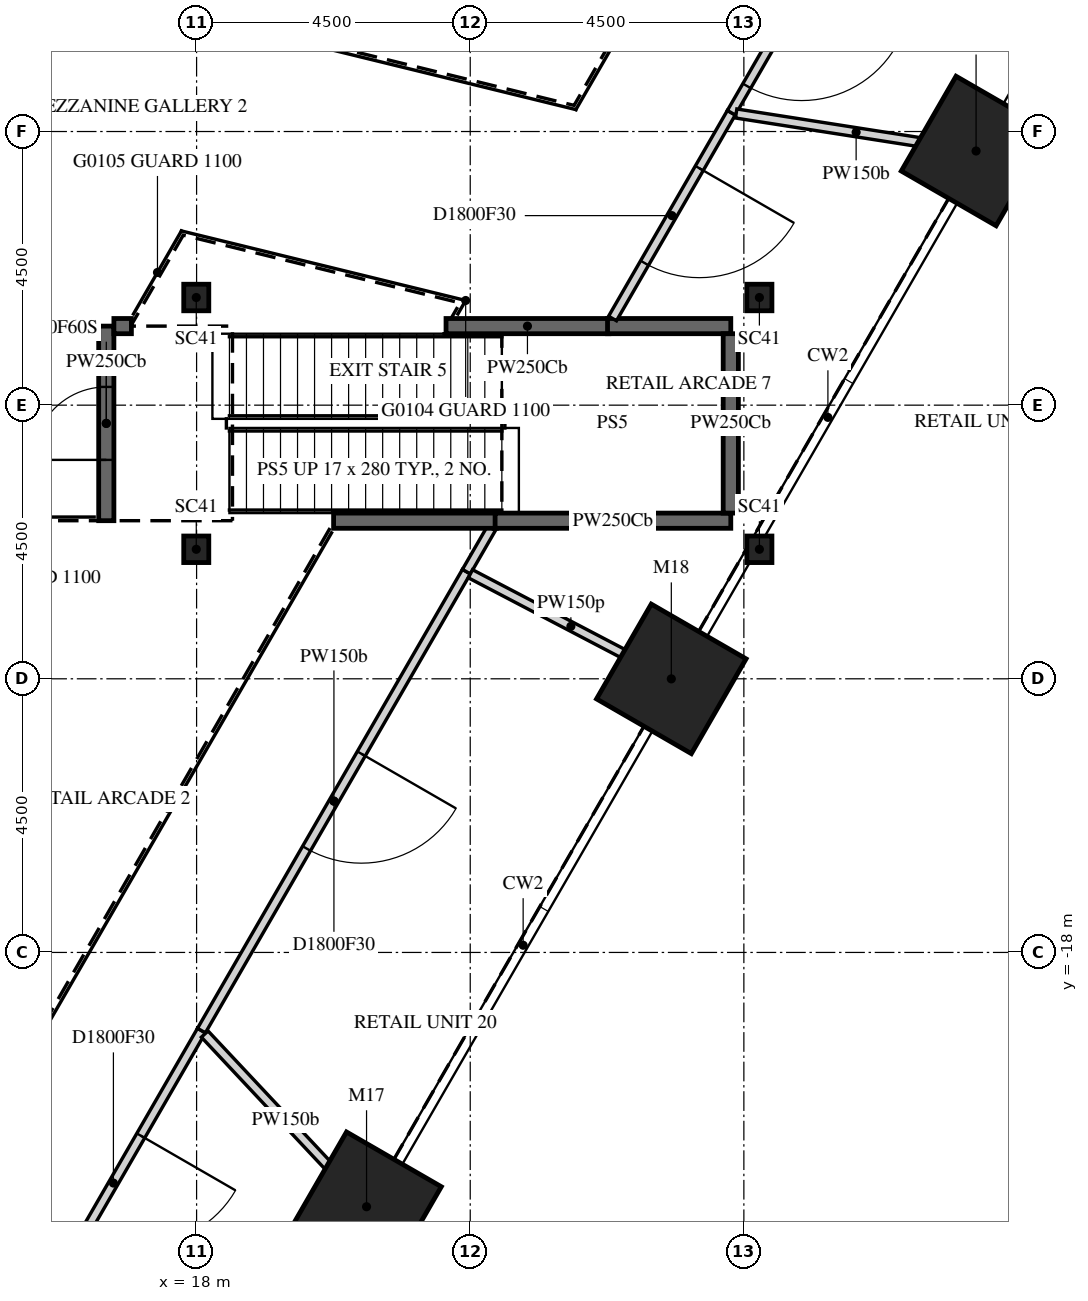
"""IFC4 building model, lengths in metres.
Left out: names, types, materials, properties, quantities, classifications, styles, units other than length and angle.
Written with IfcOpenShell. Run it as: python <this file> out.ifc"""

import sys

from ifc_helpers import new_model, si_unit, direction, frame, frame_2d, origin, origin_2d, place, context, subcontext, project, spatial, polyline, rectangle, i_section, outline, extrude, element, fill, save


model = new_model("IFC4")
c1 = context("Model", 3, precision=1e-05, world=origin(), true_north=direction((0.0, 1.0)))
c2 = subcontext(c1, "Body", "Model", "MODEL_VIEW")
j1 = project(units=[si_unit("LENGTHUNIT", "METRE"), si_unit("PLANEANGLEUNIT", "RADIAN")], contexts=[c1])
p1 = place(None, origin())
s1 = spatial("IfcSite", under=j1, at=p1, CompositionType="ELEMENT")
p2 = place(p1, origin())
s2 = spatial("IfcBuilding", under=s1, at=p2, CompositionType="ELEMENT")
p3 = place(p2, frame((0.0, 0.0, 9.0)))
s3 = spatial("IfcBuildingStorey", under=s2, at=p3, CompositionType="ELEMENT", Elevation=9.0)
for number, where, z_axis, x_axis in (
    (1, (20.795, -22.182, -0.25), (0.0, 0.0, 1.0), (-0.5, -0.866, 0.0)),
    (2, (25.807, -13.501, -0.25), (0.0, 0.0, 1.0), (-0.5, -0.866, 0.0)),
    (3, (30.819, -4.82, -0.25), (0.0, 0.0, 1.0), (-0.5, -0.866, 0.0)),
):
    element("IfcColumn", number, at=place(p3, frame(where, z_axis=z_axis, x_axis=x_axis)), inside=s3, PredefinedType="COLUMN", context=c2, shape_type="SweptSolid", body=[
        extrude(rectangle(XDim=1.8, YDim=1.8, at=origin_2d()), origin(), (0.0, 0.0, 1.0), 6.0),
    ])
for number, where, z_axis, x_axis in (
    (4, (27.255, -7.23, -0.25), (0.0, 0.0, 1.0), (1.0, 0.0, 0.0)),
    (5, (27.255, -11.37, -0.25), (0.0, 0.0, 1.0), (1.0, 0.0, 0.0)),
    (6, (17.995, -11.37, -0.25), (0.0, 0.0, 1.0), (1.0, 0.0, 0.0)),
    (7, (17.995, -7.23, -0.25), (0.0, 0.0, 1.0), (1.0, 0.0, 0.0)),
):
    element("IfcColumn", number, at=place(p3, frame(where, z_axis=z_axis, x_axis=x_axis)), inside=s3, PredefinedType="COLUMN", context=c2, shape_type="SweptSolid", body=[
        extrude(i_section(OverallWidth=0.412, OverallDepth=0.437, WebThickness=0.036, FlangeThickness=0.058, FilletRadius=0.015, at=origin_2d()), origin(), (0.0, 0.0, 1.0), 6.0),
    ])
p4 = place(p3, frame((7.91, -13.7, -0.25), z_axis=(0.0, 0.0, 1.0), x_axis=(0.499999880136, 0.866025472988, 0.0)))
e8 = element("IfcWall", 8, at=p4, inside=s3, PredefinedType="SHEAR", context=c2, shape_type="SweptSolid", body=[
    extrude(outline(polyline([(-0.173, -0.3), (15.993, -0.3), (15.646, 0.3), (0.173, 0.3), (-0.173, -0.3)])), origin(), (0.0, 0.0, 1.0), 6.0),
])
p5 = place(p4, frame((7.039, 0.0, 0.25)))
e9 = element("IfcOpeningElement", 9, at=p5, cuts=e8, PredefinedType="OPENING", context=c2, shape_type="SweptSolid", body=[
    extrude(rectangle(XDim=1.8, YDim=2.4, at=frame_2d((0.9, 1.2))), frame((0.0, 0.31, 0.0), z_axis=(0.0, -1.0, 0.0), x_axis=(1.0, 0.0, 0.0)), (0.0, 0.0, 1.0), 0.62),
])
p6 = place(p3, frame((18.08, -19.285, 0.0), z_axis=(0.0, 0.0, 1.0), x_axis=(-0.500065471556, -0.865987600464, 0.0)))
e10 = element("IfcWall", 10, at=p6, inside=s3, PredefinedType="PARTITIONING", context=c2, shape_type="SweptSolid", body=[
    extrude(rectangle(XDim=5.791, YDim=0.15, at=frame_2d((2.896, 0.0))), origin(), (0.0, 0.0, 1.0), 5.75),
])
p7 = place(p6, frame((1.996, 0.0, 0.0)))
e11 = element("IfcOpeningElement", 11, at=p7, cuts=e10, PredefinedType="OPENING", context=c2, shape_type="SweptSolid", body=[
    extrude(rectangle(XDim=1.8, YDim=2.1, at=frame_2d((0.9, 1.05))), frame((0.0, 0.085, 0.0), z_axis=(0.0, -1.0, 0.0), x_axis=(1.0, 0.0, 0.0)), (0.0, 0.0, 1.0), 0.17),
])
p8 = place(p3, frame((16.515, -10.9, 0.0), z_axis=(0.0, 0.0, 1.0), x_axis=(0.0, 1.0, 0.0)))
e12 = element("IfcWall", 12, at=p8, inside=s3, PredefinedType="PARTITIONING", context=c2, shape_type="SweptSolid", body=[
    extrude(rectangle(XDim=3.2, YDim=0.25, at=frame_2d((1.6, 0.0))), origin(), (0.0, 0.0, 1.0), 5.75),
])
p9 = place(p8, frame((1.0, 0.0, 0.0)))
e13 = element("IfcOpeningElement", 13, at=p9, cuts=e12, PredefinedType="OPENING", context=c2, shape_type="SweptSolid", body=[
    extrude(rectangle(XDim=1.2, YDim=2.1, at=frame_2d((0.6, 1.05))), frame((0.0, 0.135, 0.0), z_axis=(0.0, -1.0, 0.0), x_axis=(1.0, 0.0, 0.0)), (0.0, 0.0, 1.0), 0.27),
])
p10 = place(p3, frame((16.64, -7.7, 0.0), z_axis=(0.0, 0.0, 1.0), x_axis=(1.0, 0.0, 0.0)))
e14 = element("IfcWall", 14, at=p10, inside=s3, PredefinedType="PARTITIONING", context=c2, shape_type="SweptSolid", body=[
    extrude(rectangle(XDim=0.288, YDim=0.25, at=frame_2d((0.144, 0.0))), origin(), (0.0, 0.0, 1.0), 5.75),
])
p11 = place(p3, frame((22.437, -11.738, 0.0), z_axis=(0.0, 0.0, 1.0), x_axis=(-0.499977905081, -0.866038159916, 0.0)))
e15 = element("IfcWall", 15, at=p11, inside=s3, PredefinedType="PARTITIONING", context=c2, shape_type="SweptSolid", body=[
    extrude(rectangle(XDim=8.714, YDim=0.15, at=frame_2d((4.357, 0.0))), origin(), (0.0, 0.0, 1.0), 5.75),
])
p12 = place(p11, frame((3.457, 0.0, 0.0)))
e16 = element("IfcOpeningElement", 16, at=p12, cuts=e15, PredefinedType="OPENING", context=c2, shape_type="SweptSolid", body=[
    extrude(rectangle(XDim=1.8, YDim=2.1, at=frame_2d((0.9, 1.05))), frame((0.0, 0.085, 0.0), z_axis=(0.0, -1.0, 0.0), x_axis=(1.0, 0.0, 0.0)), (0.0, 0.0, 1.0), 0.17),
])
p13 = place(p3, frame((20.795, -22.182, 0.0), z_axis=(0.0, 0.0, 1.0), x_axis=(-0.683838873314, 0.729633055271, 0.0)))
e17 = element("IfcWall", 17, at=p13, inside=s3, PredefinedType="PARTITIONING", context=c2, shape_type="SweptSolid", body=[
    extrude(rectangle(XDim=3.892, YDim=0.15, at=frame_2d((1.946, 0.0))), origin(), (0.0, 0.0, 1.0), 5.75),
])
p14 = place(p3, frame((22.102, -7.7, 0.0), z_axis=(0.0, 0.0, 1.0), x_axis=(1.0, 0.0, 0.0)))
e18 = element("IfcWall", 18, at=p14, inside=s3, PredefinedType="PARTITIONING", context=c2, shape_type="SweptSolid", body=[
    extrude(rectangle(XDim=2.678, YDim=0.25, at=frame_2d((1.339, 0.0))), origin(), (0.0, 0.0, 1.0), 5.75),
])
p15 = place(p3, frame((22.437, -11.738, 0.0), z_axis=(0.0, 0.0, 1.0), x_axis=(0.500124476847, 0.865953525115, 0.0)))
e19 = element("IfcWall", 19, at=p15, inside=s3, PredefinedType="PARTITIONING", context=c2, shape_type="SweptSolid", body=[
    extrude(rectangle(XDim=0.823, YDim=0.15, at=frame_2d((0.412, 0.0))), origin(), (0.0, 0.0, 1.0), 5.75),
])
p16 = place(p3, frame((22.931, -10.9, 0.0), z_axis=(0.0, 0.0, 1.0), x_axis=(-1.0, 0.0, 0.0)))
e20 = element("IfcWall", 20, at=p16, inside=s3, PredefinedType="PARTITIONING", context=c2, shape_type="SweptSolid", body=[
    extrude(rectangle(XDim=2.678, YDim=0.25, at=frame_2d((1.339, 0.0))), origin(), (0.0, 0.0, 1.0), 5.75),
])
p17 = place(p3, frame((24.758, -7.7, 0.0), z_axis=(0.0, 0.0, 1.0), x_axis=(1.0, 0.0, 0.0)))
e21 = element("IfcWall", 21, at=p17, inside=s3, PredefinedType="PARTITIONING", context=c2, shape_type="SweptSolid", body=[
    extrude(rectangle(XDim=2.027, YDim=0.25, at=frame_2d((1.013, 0.0))), origin(), (0.0, 0.0, 1.0), 5.75),
])
p18 = place(p3, frame((26.794, -4.191, 0.0), z_axis=(0.0, 0.0, 1.0), x_axis=(-0.500016303021, -0.866015991026, 0.0)))
e22 = element("IfcWall", 22, at=p18, inside=s3, PredefinedType="PARTITIONING", context=c2, shape_type="SweptSolid", body=[
    extrude(rectangle(XDim=3.907, YDim=0.15, at=frame_2d((1.954, 0.0))), origin(), (0.0, 0.0, 1.0), 5.75),
])
p19 = place(p18, frame((1.054, 0.0, 0.0)))
e23 = element("IfcOpeningElement", 23, at=p19, cuts=e22, PredefinedType="OPENING", context=c2, shape_type="SweptSolid", body=[
    extrude(rectangle(XDim=1.8, YDim=2.1, at=frame_2d((0.9, 1.05))), frame((0.0, 0.085, 0.0), z_axis=(0.0, -1.0, 0.0), x_axis=(1.0, 0.0, 0.0)), (0.0, 0.0, 1.0), 0.17),
])
p20 = place(p3, frame((25.807, -13.501, 0.0), z_axis=(0.0, 0.0, 1.0), x_axis=(-0.886064695704, 0.463561597878, 0.0)))
e24 = element("IfcWall", 24, at=p20, inside=s3, PredefinedType="PARTITIONING", context=c2, shape_type="SweptSolid", body=[
    extrude(rectangle(XDim=3.728, YDim=0.15, at=frame_2d((1.864, 0.0))), origin(), (0.0, 0.0, 1.0), 5.297),
])
p21 = place(p3, frame((26.785, -10.9, 0.0), z_axis=(0.0, 0.0, 1.0), x_axis=(-1.0, 0.0, 0.0)))
e25 = element("IfcWall", 25, at=p21, inside=s3, PredefinedType="PARTITIONING", context=c2, shape_type="SweptSolid", body=[
    extrude(rectangle(XDim=3.876, YDim=0.25, at=frame_2d((1.938, 0.0))), origin(), (0.0, 0.0, 1.0), 5.75),
])
p22 = place(p3, frame((26.785, -7.825, 0.0), z_axis=(0.0, 0.0, 1.0), x_axis=(0.0, -1.0, 0.0)))
e26 = element("IfcWall", 26, at=p22, inside=s3, PredefinedType="PARTITIONING", context=c2, shape_type="SweptSolid", body=[
    extrude(rectangle(XDim=2.95, YDim=0.25, at=frame_2d((1.475, 0.0))), origin(), (0.0, 0.0, 1.0), 5.75),
])
p23 = place(p3, frame((28.204, -1.75, 0.0), z_axis=(0.0, 0.0, 1.0), x_axis=(-0.50017225779, -0.865925927858, 0.0)))
e27 = element("IfcWall", 27, at=p23, inside=s3, PredefinedType="PARTITIONING", context=c2, shape_type="SweptSolid", body=[
    extrude(rectangle(XDim=2.819, YDim=0.15, at=frame_2d((1.409, 0.0))), origin(), (0.0, 0.0, 1.0), 5.75),
])
p24 = place(p23, frame((0.51, 0.0, 0.0)))
e28 = element("IfcOpeningElement", 28, at=p24, cuts=e27, PredefinedType="OPENING", context=c2, shape_type="SweptSolid", body=[
    extrude(rectangle(XDim=1.8, YDim=2.1, at=frame_2d((0.9, 1.05))), frame((0.0, 0.085, 0.0), z_axis=(0.0, -1.0, 0.0), x_axis=(1.0, 0.0, 0.0)), (0.0, 0.0, 1.0), 0.17),
])
p25 = place(p3, frame((30.819, -4.82, 0.0), z_axis=(0.0, 0.0, 1.0), x_axis=(-0.988004164749, 0.154427233473, 0.0)))
e29 = element("IfcWall", 29, at=p25, inside=s3, PredefinedType="PARTITIONING", context=c2, shape_type="SweptSolid", body=[
    extrude(rectangle(XDim=3.993, YDim=0.15, at=frame_2d((1.997, 0.0))), origin(), (0.0, 0.0, 1.0), 5.75),
])
p26 = place(p7, origin())
e30 = element("IfcDoor", 30, at=p26, inside=s3, OperationType="DOUBLE_DOOR_SINGLE_SWING", PredefinedType="DOOR", context=c2, shape_type="SweptSolid", body=[
    extrude(rectangle(XDim=1.8, YDim=2.1, at=frame_2d((0.9, 1.05))), frame((0.0, 0.025, 0.0), z_axis=(0.0, -1.0, 0.0), x_axis=(1.0, 0.0, 0.0)), (0.0, 0.0, 1.0), 0.05),
])
fill(e11, e30)
p27 = place(p9, origin())
e31 = element("IfcDoor", 31, at=p27, inside=s3, OperationType="SINGLE_SWING_LEFT", PredefinedType="DOOR", context=c2, shape_type="SweptSolid", body=[
    extrude(rectangle(XDim=1.2, YDim=2.1, at=frame_2d((0.6, 1.05))), frame((0.0, 0.025, 0.0), z_axis=(0.0, -1.0, 0.0), x_axis=(1.0, 0.0, 0.0)), (0.0, 0.0, 1.0), 0.05),
])
fill(e13, e31)
p28 = place(p12, origin())
e32 = element("IfcDoor", 32, at=p28, inside=s3, OperationType="DOUBLE_DOOR_SINGLE_SWING", PredefinedType="DOOR", context=c2, shape_type="SweptSolid", body=[
    extrude(rectangle(XDim=1.8, YDim=2.1, at=frame_2d((0.9, 1.05))), frame((0.0, 0.025, 0.0), z_axis=(0.0, -1.0, 0.0), x_axis=(1.0, 0.0, 0.0)), (0.0, 0.0, 1.0), 0.05),
])
fill(e16, e32)
p29 = place(p19, origin())
e33 = element("IfcDoor", 33, at=p29, inside=s3, OperationType="DOUBLE_DOOR_SINGLE_SWING", PredefinedType="DOOR", context=c2, shape_type="SweptSolid", body=[
    extrude(rectangle(XDim=1.8, YDim=2.1, at=frame_2d((0.9, 1.05))), frame((0.0, 0.025, 0.0), z_axis=(0.0, -1.0, 0.0), x_axis=(1.0, 0.0, 0.0)), (0.0, 0.0, 1.0), 0.05),
])
fill(e23, e33)
p30 = place(p24, origin())
e34 = element("IfcDoor", 34, at=p30, inside=s3, OperationType="DOUBLE_DOOR_SINGLE_SWING", PredefinedType="DOOR", context=c2, shape_type="SweptSolid", body=[
    extrude(rectangle(XDim=1.8, YDim=2.1, at=frame_2d((0.9, 1.05))), frame((0.0, 0.025, 0.0), z_axis=(0.0, -1.0, 0.0), x_axis=(1.0, 0.0, 0.0)), (0.0, 0.0, 1.0), 0.05),
])
fill(e28, e34)
save(model, sys.argv[1])
